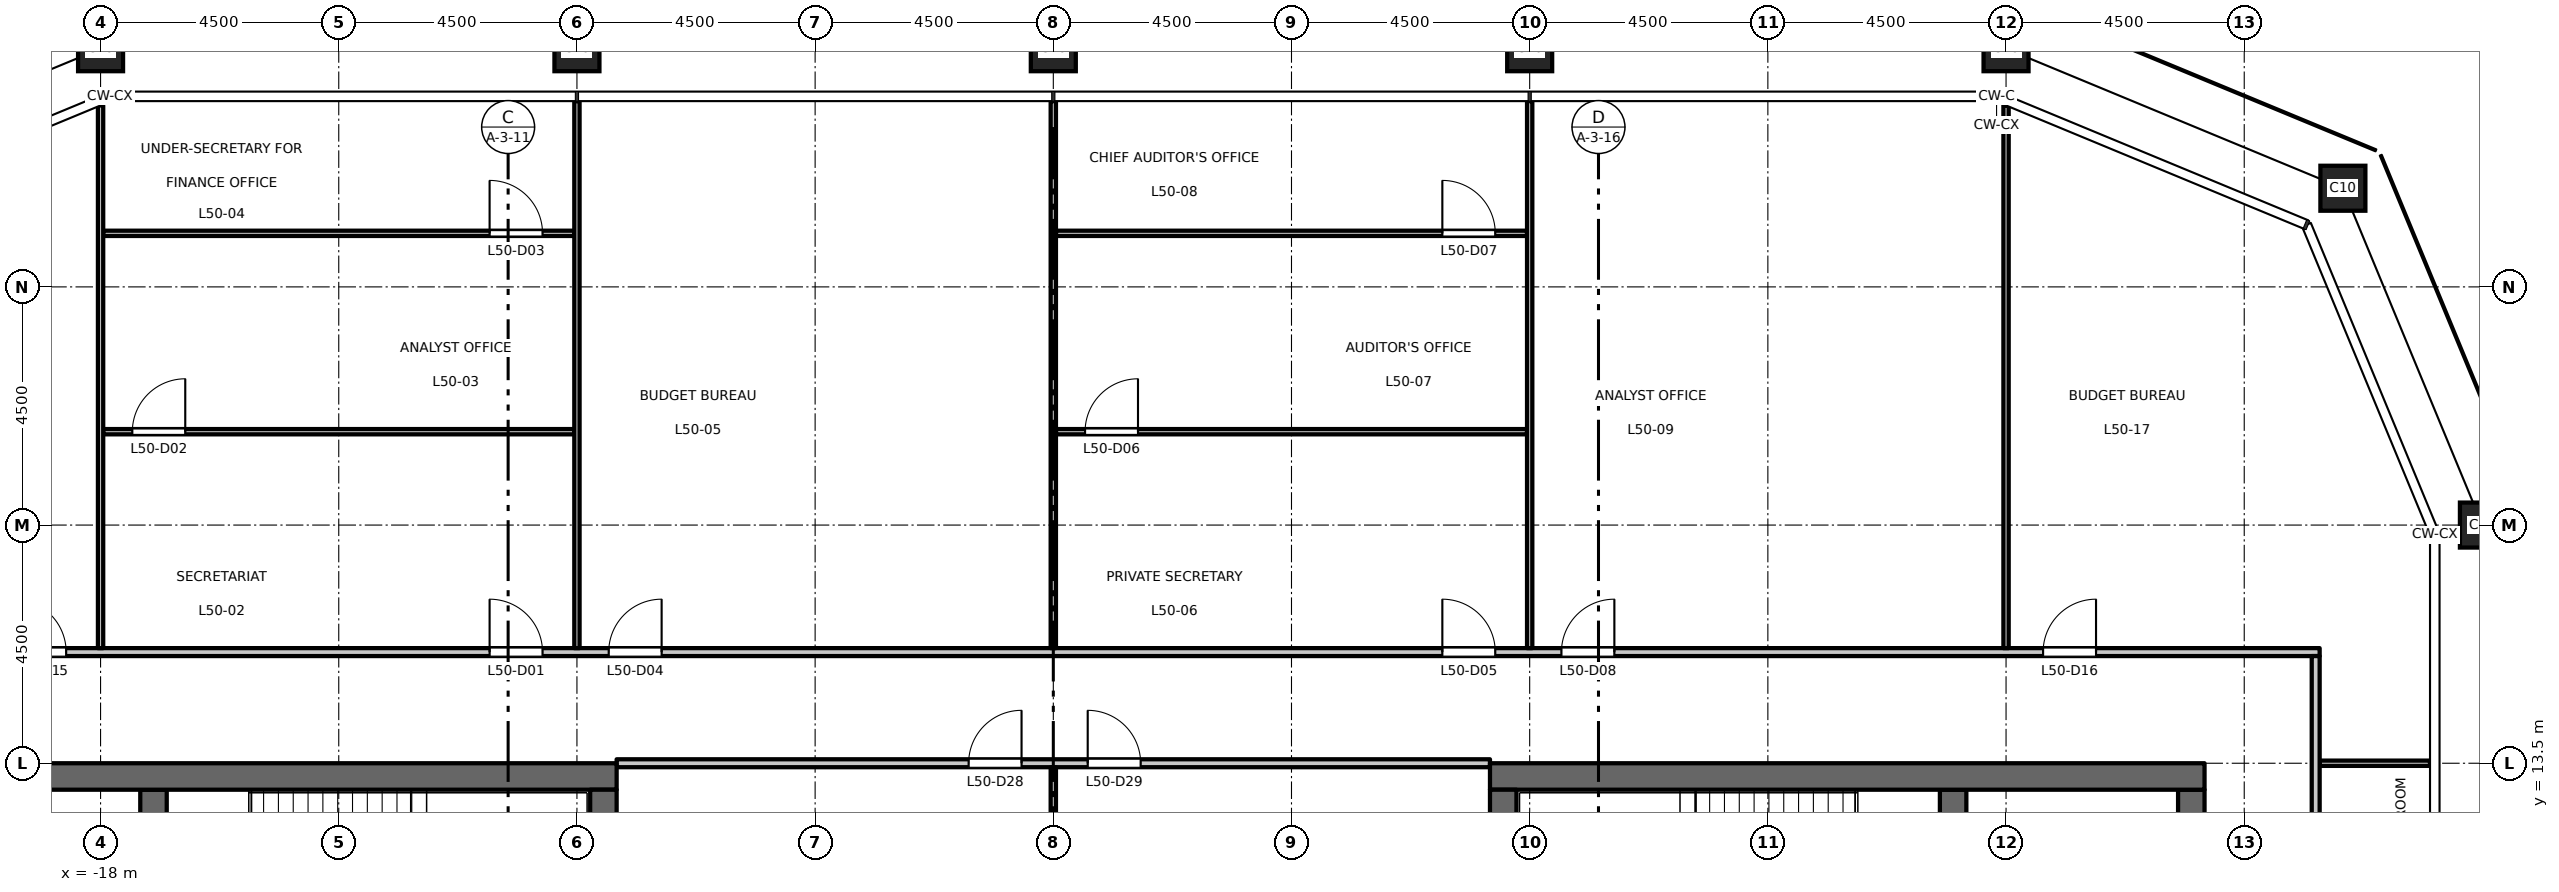
"""IFC4 building model, lengths in metres.
Left out: names, types, materials, properties, quantities, classifications, styles, units other than length and angle.
Written with IfcOpenShell. Run it as: python <this file> out.ifc"""

import sys

from ifc_helpers import new_model, si_unit, direction, frame, frame_2d, origin, origin_2d, place, context, subcontext, project, spatial, rectangle, hollow_rectangle, extrude, element, fill, save


model = new_model("IFC4")
c1 = context("Model", 3, precision=1e-05, world=origin(), true_north=direction((0.0, 1.0)))
c2 = subcontext(c1, "Body", "Model", "MODEL_VIEW")
j1 = project(units=[si_unit("LENGTHUNIT", "METRE"), si_unit("PLANEANGLEUNIT", "RADIAN")], contexts=[c1])
p1 = place(None, origin())
s1 = spatial("IfcSite", under=j1, at=p1, CompositionType="ELEMENT")
p2 = place(p1, origin())
s2 = spatial("IfcBuilding", under=s1, at=p2, CompositionType="ELEMENT")
p3 = place(p2, frame((0.0, 0.0, 233.2)))
s3 = spatial("IfcBuildingStorey", under=s2, at=p3, CompositionType="ELEMENT", Elevation=233.2)
for number, where, z_axis, x_axis in (
    (1, (27.0, 18.0, 0.0), (0.0, 0.0, 1.0), (1.0, 0.0, 0.0)),
    (2, (24.364, 24.364, 0.0), (0.0, 0.0, 1.0), (1.0, 0.0, 0.0)),
    (3, (18.0, 27.0, 0.0), (0.0, 0.0, 1.0), (1.0, 0.0, 0.0)),
    (4, (9.0, 27.0, 0.0), (0.0, 0.0, 1.0), (1.0, 0.0, 0.0)),
    (5, (0.0, 27.0, 0.0), (0.0, 0.0, 1.0), (1.0, 0.0, 0.0)),
    (6, (-9.0, 27.0, 0.0), (0.0, 0.0, 1.0), (1.0, 0.0, 0.0)),
    (7, (-18.0, 27.0, 0.0), (0.0, 0.0, 1.0), (1.0, 0.0, 0.0)),
):
    element("IfcColumn", number, at=place(p3, frame(where, z_axis=z_axis, x_axis=x_axis)), inside=s3, PredefinedType="COLUMN", context=c2, shape_type="SweptSolid", body=[
        extrude(hollow_rectangle(XDim=0.85, YDim=0.85, WallThickness=0.05, at=origin_2d()), origin(), (0.0, 0.0, 1.0), 4.5),
    ])
p4 = place(p3, frame((-17.0, 6.425, 0.0), z_axis=(0.0, 0.0, 1.0), x_axis=(0.0, 1.0, 0.0)))
e8 = element("IfcWall", 8, at=p4, inside=s3, PredefinedType="SHEAR", context=c2, shape_type="SweptSolid", body=[
    extrude(rectangle(XDim=6.575, YDim=0.5, at=frame_2d((3.288, 0.0))), origin(), (0.0, 0.0, 1.0), 4.35),
])
p5 = place(p3, frame((-8.25, 13.25, 0.0), z_axis=(0.0, 0.0, 1.0), x_axis=(-1.0, 0.0, 0.0)))
e9 = element("IfcWall", 9, at=p5, inside=s3, PredefinedType="SHEAR", context=c2, shape_type="SweptSolid", body=[
    extrude(rectangle(XDim=13.5, YDim=0.5, at=frame_2d((6.75, 0.0))), origin(), (0.0, 0.0, 1.0), 4.35),
])
p6 = place(p3, frame((-8.5, -13.0, 0.0), z_axis=(0.0, 0.0, 1.0), x_axis=(0.0, 1.0, 0.0)))
e10 = element("IfcWall", 10, at=p6, inside=s3, PredefinedType="SHEAR", context=c2, shape_type="SweptSolid", body=[
    extrude(rectangle(XDim=26.0, YDim=0.5, at=frame_2d((13.0, 0.0))), origin(), (0.0, 0.0, 1.0), 4.35),
])
p7 = place(p3, frame((21.5, -13.0, 0.0), z_axis=(0.0, 0.0, 1.0), x_axis=(0.0, 1.0, 0.0)))
e11 = element("IfcWall", 11, at=p7, inside=s3, PredefinedType="SHEAR", context=c2, shape_type="SweptSolid", body=[
    extrude(rectangle(XDim=26.0, YDim=0.5, at=frame_2d((13.0, 0.0))), origin(), (0.0, 0.0, 1.0), 4.35),
])
p8 = place(p7, frame((16.825, 0.0, 0.0)))
e12 = element("IfcOpeningElement", 12, at=p8, cuts=e11, PredefinedType="OPENING", context=c2, shape_type="SweptSolid", body=[
    extrude(rectangle(XDim=1.8, YDim=2.1, at=frame_2d((0.9, 1.05))), frame((0.0, 0.26, 0.0), z_axis=(0.0, -1.0, 0.0), x_axis=(1.0, 0.0, 0.0)), (0.0, 0.0, 1.0), 0.52),
])
p9 = place(p7, frame((7.375, 0.0, 0.0)))
e13 = element("IfcOpeningElement", 13, at=p9, cuts=e11, PredefinedType="OPENING", context=c2, shape_type="SweptSolid", body=[
    extrude(rectangle(XDim=1.8, YDim=2.1, at=frame_2d((0.9, 1.05))), frame((0.0, 0.26, 0.0), z_axis=(0.0, -1.0, 0.0), x_axis=(1.0, 0.0, 0.0)), (0.0, 0.0, 1.0), 0.52),
])
p10 = place(p3, frame((17.0, 6.425, 0.0), z_axis=(0.0, 0.0, 1.0), x_axis=(0.0, 1.0, 0.0)))
e14 = element("IfcWall", 14, at=p10, inside=s3, PredefinedType="SHEAR", context=c2, shape_type="SweptSolid", body=[
    extrude(rectangle(XDim=6.575, YDim=0.5, at=frame_2d((3.288, 0.0))), origin(), (0.0, 0.0, 1.0), 4.35),
])
p11 = place(p3, frame((8.25, 13.25, 0.0), z_axis=(0.0, 0.0, 1.0), x_axis=(1.0, 0.0, 0.0)))
e15 = element("IfcWall", 15, at=p11, inside=s3, PredefinedType="SHEAR", context=c2, shape_type="SweptSolid", body=[
    extrude(rectangle(XDim=13.5, YDim=0.5, at=frame_2d((6.75, 0.0))), origin(), (0.0, 0.0, 1.0), 4.35),
])
p12 = place(p3, frame((8.5, -13.0, 0.0), z_axis=(0.0, 0.0, 1.0), x_axis=(0.0, 1.0, 0.0)))
e16 = element("IfcWall", 16, at=p12, inside=s3, PredefinedType="SHEAR", context=c2, shape_type="SweptSolid", body=[
    extrude(rectangle(XDim=26.0, YDim=0.5, at=frame_2d((13.0, 0.0))), origin(), (0.0, 0.0, 1.0), 4.35),
])
p13 = place(p3, frame((23.925, 13.5, 0.0), z_axis=(0.0, 0.0, 1.0), x_axis=(1.0, 0.0, 0.0)))
e17 = element("IfcWall", 17, at=p13, inside=s3, PredefinedType="PARTITIONING", context=c2, shape_type="SweptSolid", body=[
    extrude(rectangle(XDim=2.085, YDim=0.1, at=frame_2d((1.042, 0.0))), origin(), (0.0, 0.0, 1.0), 4.35),
])
p14 = place(p3, frame((-8.25, 13.5, 0.0), z_axis=(0.0, 0.0, 1.0), x_axis=(1.0, 0.0, 0.0)))
e18 = element("IfcWall", 18, at=p14, inside=s3, PredefinedType="PARTITIONING", context=c2, shape_type="SweptSolid", body=[
    extrude(rectangle(XDim=16.5, YDim=0.15, at=frame_2d((8.25, 0.0))), origin(), (0.0, 0.0, 1.0), 4.35),
])
p15 = place(p14, frame((6.65, 0.0, 0.0)))
e19 = element("IfcOpeningElement", 19, at=p15, cuts=e18, PredefinedType="OPENING", context=c2, shape_type="SweptSolid", body=[
    extrude(rectangle(XDim=1.0, YDim=2.1, at=frame_2d((0.5, 1.05))), frame((0.0, 0.085, 0.0), z_axis=(0.0, -1.0, 0.0), x_axis=(1.0, 0.0, 0.0)), (0.0, 0.0, 1.0), 0.17),
])
p16 = place(p14, frame((8.9, 0.0, 0.0)))
e20 = element("IfcOpeningElement", 20, at=p16, cuts=e18, PredefinedType="OPENING", context=c2, shape_type="SweptSolid", body=[
    extrude(rectangle(XDim=1.0, YDim=2.1, at=frame_2d((0.5, 1.05))), frame((0.0, 0.085, 0.0), z_axis=(0.0, -1.0, 0.0), x_axis=(1.0, 0.0, 0.0)), (0.0, 0.0, 1.0), 0.17),
])
p17 = place(p3, frame((-23.925, 15.6, 0.0), z_axis=(0.0, 0.0, 1.0), x_axis=(1.0, 0.0, 0.0)))
e21 = element("IfcWall", 21, at=p17, inside=s3, PredefinedType="PARTITIONING", context=c2, shape_type="SweptSolid", body=[
    extrude(rectangle(XDim=47.85, YDim=0.15, at=frame_2d((23.925, 0.0))), origin(), (0.0, 0.0, 1.0), 4.35),
])
p18 = place(p17, frame((13.275, 0.0, 0.0)))
e22 = element("IfcOpeningElement", 22, at=p18, cuts=e21, PredefinedType="OPENING", context=c2, shape_type="SweptSolid", body=[
    extrude(rectangle(XDim=1.0, YDim=2.1, at=frame_2d((0.5, 1.05))), frame((0.0, 0.085, 0.0), z_axis=(0.0, -1.0, 0.0), x_axis=(1.0, 0.0, 0.0)), (0.0, 0.0, 1.0), 0.17),
])
p19 = place(p17, frame((15.525, 0.0, 0.0)))
e23 = element("IfcOpeningElement", 23, at=p19, cuts=e21, PredefinedType="OPENING", context=c2, shape_type="SweptSolid", body=[
    extrude(rectangle(XDim=1.0, YDim=2.1, at=frame_2d((0.5, 1.05))), frame((0.0, 0.085, 0.0), z_axis=(0.0, -1.0, 0.0), x_axis=(1.0, 0.0, 0.0)), (0.0, 0.0, 1.0), 0.17),
])
p20 = place(p17, frame((31.275, 0.0, 0.0)))
e24 = element("IfcOpeningElement", 24, at=p20, cuts=e21, PredefinedType="OPENING", context=c2, shape_type="SweptSolid", body=[
    extrude(rectangle(XDim=1.0, YDim=2.1, at=frame_2d((0.5, 1.05))), frame((0.0, 0.085, 0.0), z_axis=(0.0, -1.0, 0.0), x_axis=(1.0, 0.0, 0.0)), (0.0, 0.0, 1.0), 0.17),
])
p21 = place(p17, frame((33.525, 0.0, 0.0)))
e25 = element("IfcOpeningElement", 25, at=p21, cuts=e21, PredefinedType="OPENING", context=c2, shape_type="SweptSolid", body=[
    extrude(rectangle(XDim=1.0, YDim=2.1, at=frame_2d((0.5, 1.05))), frame((0.0, 0.085, 0.0), z_axis=(0.0, -1.0, 0.0), x_axis=(1.0, 0.0, 0.0)), (0.0, 0.0, 1.0), 0.17),
])
p22 = place(p17, frame((4.275, 0.0, 0.0)))
e26 = element("IfcOpeningElement", 26, at=p22, cuts=e21, PredefinedType="OPENING", context=c2, shape_type="SweptSolid", body=[
    extrude(rectangle(XDim=1.0, YDim=2.1, at=frame_2d((0.5, 1.05))), frame((0.0, 0.085, 0.0), z_axis=(0.0, -1.0, 0.0), x_axis=(1.0, 0.0, 0.0)), (0.0, 0.0, 1.0), 0.17),
])
p23 = place(p17, frame((42.625, 0.0, 0.0)))
e27 = element("IfcOpeningElement", 27, at=p23, cuts=e21, PredefinedType="OPENING", context=c2, shape_type="SweptSolid", body=[
    extrude(rectangle(XDim=1.0, YDim=2.1, at=frame_2d((0.5, 1.05))), frame((0.0, 0.085, 0.0), z_axis=(0.0, -1.0, 0.0), x_axis=(1.0, 0.0, 0.0)), (0.0, 0.0, 1.0), 0.17),
])
p24 = place(p3, frame((-17.95, 19.764, 0.0), z_axis=(0.0, 0.0, 1.0), x_axis=(1.0, 0.0, 0.0)))
e28 = element("IfcWall", 28, at=p24, inside=s3, PredefinedType="PARTITIONING", context=c2, shape_type="SweptSolid", body=[
    extrude(rectangle(XDim=8.9, YDim=0.1, at=frame_2d((4.45, 0.0))), origin(), (0.0, 0.0, 1.0), 4.35),
])
p25 = place(p24, frame((0.55, 0.0, 0.0)))
e29 = element("IfcOpeningElement", 29, at=p25, cuts=e28, PredefinedType="OPENING", context=c2, shape_type="SweptSolid", body=[
    extrude(rectangle(XDim=1.0, YDim=2.1, at=frame_2d((0.5, 1.05))), frame((0.0, 0.06, 0.0), z_axis=(0.0, -1.0, 0.0), x_axis=(1.0, 0.0, 0.0)), (0.0, 0.0, 1.0), 0.12),
])
p26 = place(p3, frame((0.05, 19.764, 0.0), z_axis=(0.0, 0.0, 1.0), x_axis=(1.0, 0.0, 0.0)))
e30 = element("IfcWall", 30, at=p26, inside=s3, PredefinedType="PARTITIONING", context=c2, shape_type="SweptSolid", body=[
    extrude(rectangle(XDim=8.9, YDim=0.1, at=frame_2d((4.45, 0.0))), origin(), (0.0, 0.0, 1.0), 4.35),
])
p27 = place(p26, frame((0.55, 0.0, 0.0)))
e31 = element("IfcOpeningElement", 31, at=p27, cuts=e30, PredefinedType="OPENING", context=c2, shape_type="SweptSolid", body=[
    extrude(rectangle(XDim=1.0, YDim=2.1, at=frame_2d((0.5, 1.05))), frame((0.0, 0.06, 0.0), z_axis=(0.0, -1.0, 0.0), x_axis=(1.0, 0.0, 0.0)), (0.0, 0.0, 1.0), 0.12),
])
p28 = place(p3, frame((-17.95, 23.512, 0.0), z_axis=(0.0, 0.0, 1.0), x_axis=(1.0, 0.0, 0.0)))
e32 = element("IfcWall", 32, at=p28, inside=s3, PredefinedType="PARTITIONING", context=c2, shape_type="SweptSolid", body=[
    extrude(rectangle(XDim=8.9, YDim=0.1, at=frame_2d((4.45, 0.0))), origin(), (0.0, 0.0, 1.0), 4.35),
])
p29 = place(p28, frame((7.3, 0.0, 0.0)))
e33 = element("IfcOpeningElement", 33, at=p29, cuts=e32, PredefinedType="OPENING", context=c2, shape_type="SweptSolid", body=[
    extrude(rectangle(XDim=1.0, YDim=2.1, at=frame_2d((0.5, 1.05))), frame((0.0, 0.06, 0.0), z_axis=(0.0, -1.0, 0.0), x_axis=(1.0, 0.0, 0.0)), (0.0, 0.0, 1.0), 0.12),
])
p30 = place(p3, frame((0.05, 23.512, 0.0), z_axis=(0.0, 0.0, 1.0), x_axis=(1.0, 0.0, 0.0)))
e34 = element("IfcWall", 34, at=p30, inside=s3, PredefinedType="PARTITIONING", context=c2, shape_type="SweptSolid", body=[
    extrude(rectangle(XDim=8.9, YDim=0.1, at=frame_2d((4.45, 0.0))), origin(), (0.0, 0.0, 1.0), 4.35),
])
p31 = place(p30, frame((7.3, 0.0, 0.0)))
e35 = element("IfcOpeningElement", 35, at=p31, cuts=e34, PredefinedType="OPENING", context=c2, shape_type="SweptSolid", body=[
    extrude(rectangle(XDim=1.0, YDim=2.1, at=frame_2d((0.5, 1.05))), frame((0.0, 0.06, 0.0), z_axis=(0.0, -1.0, 0.0), x_axis=(1.0, 0.0, 0.0)), (0.0, 0.0, 1.0), 0.12),
])
p32 = place(p3, frame((-18.0, 15.675, 0.0), z_axis=(0.0, 0.0, 1.0), x_axis=(0.0, 1.0, 0.0)))
e36 = element("IfcWall", 36, at=p32, inside=s3, PredefinedType="PARTITIONING", context=c2, shape_type="SweptSolid", body=[
    extrude(rectangle(XDim=10.253, YDim=0.1, at=frame_2d((5.126, 0.0))), origin(), (0.0, 0.0, 1.0), 3.65),
])
p33 = place(p3, frame((-9.0, 15.675, 0.0), z_axis=(0.0, 0.0, 1.0), x_axis=(0.0, 1.0, 0.0)))
e37 = element("IfcWall", 37, at=p33, inside=s3, PredefinedType="PARTITIONING", context=c2, shape_type="SweptSolid", body=[
    extrude(rectangle(XDim=10.335, YDim=0.1, at=frame_2d((5.167, 0.0))), origin(), (0.0, 0.0, 1.0), 3.65),
])
p34 = place(p3, frame((0.0, 8.6, 0.0), z_axis=(0.0, 0.0, 1.0), x_axis=(0.0, 1.0, 0.0)))
e38 = element("IfcWall", 38, at=p34, inside=s3, PredefinedType="PARTITIONING", context=c2, shape_type="SweptSolid", body=[
    extrude(rectangle(XDim=4.825, YDim=0.1, at=frame_2d((2.413, 0.0))), origin(), (0.0, 0.0, 1.0), 3.55),
])
p35 = place(p3, frame((0.0, 15.675, 0.0), z_axis=(0.0, 0.0, 1.0), x_axis=(0.0, 1.0, 0.0)))
e39 = element("IfcWall", 39, at=p35, inside=s3, PredefinedType="PARTITIONING", context=c2, shape_type="SweptSolid", body=[
    extrude(rectangle(XDim=10.335, YDim=0.1, at=frame_2d((5.167, 0.0))), origin(), (0.0, 0.0, 1.0), 3.55),
])
p36 = place(p3, frame((9.0, 15.675, 0.0), z_axis=(0.0, 0.0, 1.0), x_axis=(0.0, 1.0, 0.0)))
e40 = element("IfcWall", 40, at=p36, inside=s3, PredefinedType="PARTITIONING", context=c2, shape_type="SweptSolid", body=[
    extrude(rectangle(XDim=10.335, YDim=0.1, at=frame_2d((5.167, 0.0))), origin(), (0.0, 0.0, 1.0), 3.65),
])
p37 = place(p3, frame((18.0, 15.675, 0.0), z_axis=(0.0, 0.0, 1.0), x_axis=(0.0, 1.0, 0.0)))
e41 = element("IfcWall", 41, at=p37, inside=s3, PredefinedType="PARTITIONING", context=c2, shape_type="SweptSolid", body=[
    extrude(rectangle(XDim=10.253, YDim=0.1, at=frame_2d((5.126, 0.0))), origin(), (0.0, 0.0, 1.0), 3.65),
])
p38 = place(p3, frame((23.85, -15.525, 0.0), z_axis=(0.0, 0.0, 1.0), x_axis=(0.0, 1.0, 0.0)))
e42 = element("IfcWall", 42, at=p38, inside=s3, PredefinedType="PARTITIONING", context=c2, shape_type="SweptSolid", body=[
    extrude(rectangle(XDim=31.05, YDim=0.15, at=frame_2d((15.525, 0.0))), origin(), (0.0, 0.0, 1.0), 4.35),
])
p39 = place(p38, frame((4.925, 0.0, 0.0)))
e43 = element("IfcOpeningElement", 43, at=p39, cuts=e42, PredefinedType="OPENING", context=c2, shape_type="SweptSolid", body=[
    extrude(rectangle(XDim=1.0, YDim=2.1, at=frame_2d((0.5, 1.05))), frame((0.0, 0.085, 0.0), z_axis=(0.0, -1.0, 0.0), x_axis=(1.0, 0.0, 0.0)), (0.0, 0.0, 1.0), 0.17),
])
p40 = place(p38, frame((7.175, 0.0, 0.0)))
e44 = element("IfcOpeningElement", 44, at=p40, cuts=e42, PredefinedType="OPENING", context=c2, shape_type="SweptSolid", body=[
    extrude(rectangle(XDim=1.0, YDim=2.1, at=frame_2d((0.5, 1.05))), frame((0.0, 0.085, 0.0), z_axis=(0.0, -1.0, 0.0), x_axis=(1.0, 0.0, 0.0)), (0.0, 0.0, 1.0), 0.17),
])
p41 = place(p38, frame((22.925, 0.0, 0.0)))
e45 = element("IfcOpeningElement", 45, at=p41, cuts=e42, PredefinedType="OPENING", context=c2, shape_type="SweptSolid", body=[
    extrude(rectangle(XDim=1.0, YDim=2.1, at=frame_2d((0.5, 1.05))), frame((0.0, 0.085, 0.0), z_axis=(0.0, -1.0, 0.0), x_axis=(1.0, 0.0, 0.0)), (0.0, 0.0, 1.0), 0.17),
])
p42 = place(p38, frame((25.175, 0.0, 0.0)))
e46 = element("IfcOpeningElement", 46, at=p42, cuts=e42, PredefinedType="OPENING", context=c2, shape_type="SweptSolid", body=[
    extrude(rectangle(XDim=1.0, YDim=2.1, at=frame_2d((0.5, 1.05))), frame((0.0, 0.085, 0.0), z_axis=(0.0, -1.0, 0.0), x_axis=(1.0, 0.0, 0.0)), (0.0, 0.0, 1.0), 0.17),
])
p43 = place(p18, origin())
e47 = element("IfcDoor", 47, at=p43, inside=s3, OperationType="SINGLE_SWING_LEFT", PredefinedType="DOOR", context=c2, shape_type="SweptSolid", body=[
    extrude(rectangle(XDim=1.0, YDim=2.1, at=frame_2d((0.5, 1.05))), frame((0.0, 0.025, 0.0), z_axis=(0.0, -1.0, 0.0), x_axis=(1.0, 0.0, 0.0)), (0.0, 0.0, 1.0), 0.05),
])
fill(e22, e47)
p44 = place(p25, origin())
e48 = element("IfcDoor", 48, at=p44, inside=s3, OperationType="SINGLE_SWING_RIGHT", PredefinedType="DOOR", context=c2, shape_type="SweptSolid", body=[
    extrude(rectangle(XDim=1.0, YDim=2.1, at=frame_2d((0.5, 1.05))), frame((0.0, 0.025, 0.0), z_axis=(0.0, -1.0, 0.0), x_axis=(1.0, 0.0, 0.0)), (0.0, 0.0, 1.0), 0.05),
])
fill(e29, e48)
p45 = place(p29, origin())
e49 = element("IfcDoor", 49, at=p45, inside=s3, OperationType="SINGLE_SWING_LEFT", PredefinedType="DOOR", context=c2, shape_type="SweptSolid", body=[
    extrude(rectangle(XDim=1.0, YDim=2.1, at=frame_2d((0.5, 1.05))), frame((0.0, 0.025, 0.0), z_axis=(0.0, -1.0, 0.0), x_axis=(1.0, 0.0, 0.0)), (0.0, 0.0, 1.0), 0.05),
])
fill(e33, e49)
p46 = place(p19, origin())
e50 = element("IfcDoor", 50, at=p46, inside=s3, OperationType="SINGLE_SWING_RIGHT", PredefinedType="DOOR", context=c2, shape_type="SweptSolid", body=[
    extrude(rectangle(XDim=1.0, YDim=2.1, at=frame_2d((0.5, 1.05))), frame((0.0, 0.025, 0.0), z_axis=(0.0, -1.0, 0.0), x_axis=(1.0, 0.0, 0.0)), (0.0, 0.0, 1.0), 0.05),
])
fill(e23, e50)
p47 = place(p20, origin())
e51 = element("IfcDoor", 51, at=p47, inside=s3, OperationType="SINGLE_SWING_LEFT", PredefinedType="DOOR", context=c2, shape_type="SweptSolid", body=[
    extrude(rectangle(XDim=1.0, YDim=2.1, at=frame_2d((0.5, 1.05))), frame((0.0, 0.025, 0.0), z_axis=(0.0, -1.0, 0.0), x_axis=(1.0, 0.0, 0.0)), (0.0, 0.0, 1.0), 0.05),
])
fill(e24, e51)
p48 = place(p27, origin())
e52 = element("IfcDoor", 52, at=p48, inside=s3, OperationType="SINGLE_SWING_RIGHT", PredefinedType="DOOR", context=c2, shape_type="SweptSolid", body=[
    extrude(rectangle(XDim=1.0, YDim=2.1, at=frame_2d((0.5, 1.05))), frame((0.0, 0.025, 0.0), z_axis=(0.0, -1.0, 0.0), x_axis=(1.0, 0.0, 0.0)), (0.0, 0.0, 1.0), 0.05),
])
fill(e31, e52)
p49 = place(p31, origin())
e53 = element("IfcDoor", 53, at=p49, inside=s3, OperationType="SINGLE_SWING_LEFT", PredefinedType="DOOR", context=c2, shape_type="SweptSolid", body=[
    extrude(rectangle(XDim=1.0, YDim=2.1, at=frame_2d((0.5, 1.05))), frame((0.0, 0.025, 0.0), z_axis=(0.0, -1.0, 0.0), x_axis=(1.0, 0.0, 0.0)), (0.0, 0.0, 1.0), 0.05),
])
fill(e35, e53)
p50 = place(p21, origin())
e54 = element("IfcDoor", 54, at=p50, inside=s3, OperationType="SINGLE_SWING_RIGHT", PredefinedType="DOOR", context=c2, shape_type="SweptSolid", body=[
    extrude(rectangle(XDim=1.0, YDim=2.1, at=frame_2d((0.5, 1.05))), frame((0.0, 0.025, 0.0), z_axis=(0.0, -1.0, 0.0), x_axis=(1.0, 0.0, 0.0)), (0.0, 0.0, 1.0), 0.05),
])
fill(e25, e54)
p51 = place(p22, origin())
e55 = element("IfcDoor", 55, at=p51, inside=s3, OperationType="SINGLE_SWING_LEFT", PredefinedType="DOOR", context=c2, shape_type="SweptSolid", body=[
    extrude(rectangle(XDim=1.0, YDim=2.1, at=frame_2d((0.5, 1.05))), frame((0.0, 0.025, 0.0), z_axis=(0.0, -1.0, 0.0), x_axis=(1.0, 0.0, 0.0)), (0.0, 0.0, 1.0), 0.05),
])
fill(e26, e55)
p52 = place(p23, origin())
e56 = element("IfcDoor", 56, at=p52, inside=s3, OperationType="SINGLE_SWING_RIGHT", PredefinedType="DOOR", context=c2, shape_type="SweptSolid", body=[
    extrude(rectangle(XDim=1.0, YDim=2.1, at=frame_2d((0.5, 1.05))), frame((0.0, 0.025, 0.0), z_axis=(0.0, -1.0, 0.0), x_axis=(1.0, 0.0, 0.0)), (0.0, 0.0, 1.0), 0.05),
])
fill(e27, e56)
p53 = place(p15, origin())
e57 = element("IfcDoor", 57, at=p53, inside=s3, OperationType="SINGLE_SWING_RIGHT", PredefinedType="DOOR", context=c2, shape_type="SweptSolid", body=[
    extrude(rectangle(XDim=1.0, YDim=2.1, at=frame_2d((0.5, 1.05))), frame((0.0, 0.025, 0.0), z_axis=(0.0, -1.0, 0.0), x_axis=(1.0, 0.0, 0.0)), (0.0, 0.0, 1.0), 0.05),
])
fill(e19, e57)
p54 = place(p16, origin())
e58 = element("IfcDoor", 58, at=p54, inside=s3, OperationType="SINGLE_SWING_LEFT", PredefinedType="DOOR", context=c2, shape_type="SweptSolid", body=[
    extrude(rectangle(XDim=1.0, YDim=2.1, at=frame_2d((0.5, 1.05))), frame((0.0, 0.025, 0.0), z_axis=(0.0, -1.0, 0.0), x_axis=(1.0, 0.0, 0.0)), (0.0, 0.0, 1.0), 0.05),
])
fill(e20, e58)
save(model, sys.argv[1])
